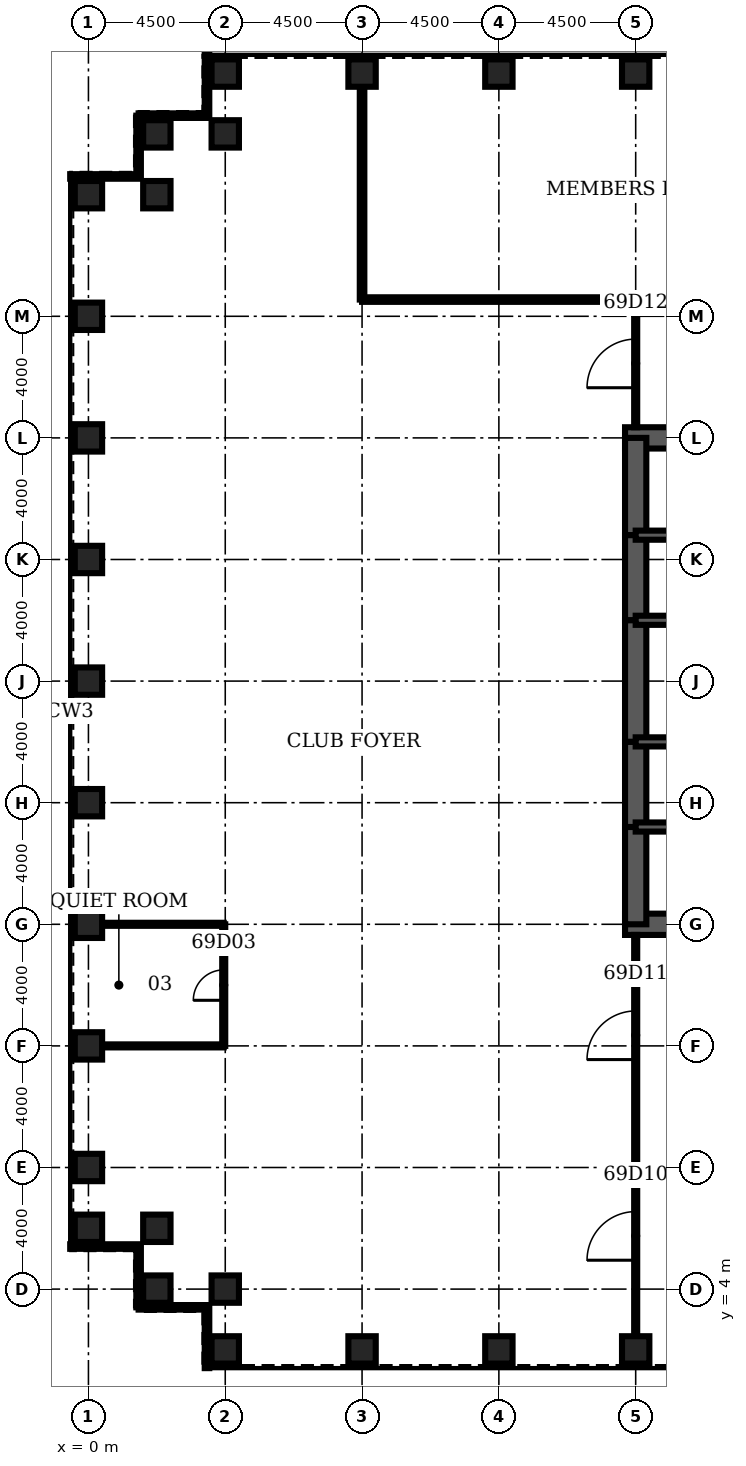
"""IFC4 building model, lengths in metres.
Left out: names, types, materials, properties, quantities, classifications, styles, units other than length and angle.
Written with IfcOpenShell. Run it as: python <this file> out.ifc"""

import sys

from ifc_helpers import new_model, si_unit, direction, frame, frame_2d, origin, origin_2d, place, context, subcontext, project, spatial, rectangle, hollow_rectangle, extrude, element, fill, save


model = new_model("IFC4")
c1 = context("Model", 3, precision=1e-05, world=origin(), true_north=direction((0.0, 1.0)))
c2 = subcontext(c1, "Body", "Model", "MODEL_VIEW")
j1 = project(units=[si_unit("LENGTHUNIT", "METRE"), si_unit("PLANEANGLEUNIT", "RADIAN")], contexts=[c1])
p1 = place(None, origin())
s1 = spatial("IfcSite", under=j1, at=p1, CompositionType="ELEMENT")
p2 = place(p1, origin())
s2 = spatial("IfcBuilding", under=s1, at=p2, CompositionType="ELEMENT")
p3 = place(p2, frame((0.0, 0.0, 304.7)))
s3 = spatial("IfcBuildingStorey", under=s2, at=p3, CompositionType="ELEMENT", Elevation=304.7)
for number, where, z_axis, x_axis in (
    (1, (4.5, 2.0, 0.0), (0.0, 0.0, 1.0), (0.0, 1.0, 0.0)),
    (2, (9.0, 2.0, 0.0), (0.0, 0.0, 1.0), (0.0, 1.0, 0.0)),
    (3, (13.5, 2.0, 0.0), (0.0, 0.0, 1.0), (0.0, 1.0, 0.0)),
    (4, (18.0, 2.0, 0.0), (0.0, 0.0, 1.0), (0.0, 1.0, 0.0)),
    (5, (18.0, 44.0, 0.0), (0.0, 0.0, 1.0), (0.0, 1.0, 0.0)),
    (6, (13.5, 44.0, 0.0), (0.0, 0.0, 1.0), (0.0, 1.0, 0.0)),
    (7, (9.0, 44.0, 0.0), (0.0, 0.0, 1.0), (0.0, 1.0, 0.0)),
    (8, (4.5, 44.0, 0.0), (0.0, 0.0, 1.0), (0.0, 1.0, 0.0)),
    (9, (4.5, 42.0, 0.0), (0.0, 0.0, 1.0), (0.0, 1.0, 0.0)),
    (10, (2.25, 42.0, 0.0), (0.0, 0.0, 1.0), (1.0, 0.0, 0.0)),
    (11, (2.25, 40.0, 0.0), (0.0, 0.0, 1.0), (1.0, 0.0, 0.0)),
    (12, (0.0, 40.0, 0.0), (0.0, 0.0, 1.0), (1.0, 0.0, 0.0)),
    (13, (0.0, 36.0, 0.0), (0.0, 0.0, 1.0), (1.0, 0.0, 0.0)),
    (14, (0.0, 32.0, 0.0), (0.0, 0.0, 1.0), (1.0, 0.0, 0.0)),
    (15, (0.0, 28.0, 0.0), (0.0, 0.0, 1.0), (1.0, 0.0, 0.0)),
    (16, (0.0, 24.0, 0.0), (0.0, 0.0, 1.0), (1.0, 0.0, 0.0)),
    (17, (0.0, 20.0, 0.0), (0.0, 0.0, 1.0), (1.0, 0.0, 0.0)),
    (18, (0.0, 16.0, 0.0), (0.0, 0.0, 1.0), (1.0, 0.0, 0.0)),
    (19, (0.0, 12.0, 0.0), (0.0, 0.0, 1.0), (1.0, 0.0, 0.0)),
    (20, (0.0, 8.0, 0.0), (0.0, 0.0, 1.0), (1.0, 0.0, 0.0)),
    (21, (0.0, 6.0, 0.0), (0.0, 0.0, 1.0), (1.0, 0.0, 0.0)),
    (22, (2.25, 6.0, 0.0), (0.0, 0.0, 1.0), (1.0, 0.0, 0.0)),
    (23, (2.25, 4.0, 0.0), (0.0, 0.0, 1.0), (1.0, 0.0, 0.0)),
    (24, (4.5, 4.0, 0.0), (0.0, 0.0, 1.0), (0.0, 1.0, 0.0)),
):
    element("IfcColumn", number, at=place(p3, frame(where, z_axis=z_axis, x_axis=x_axis)), inside=s3, PredefinedType="COLUMN", context=c2, shape_type="SweptSolid", body=[
        extrude(hollow_rectangle(XDim=0.9, YDim=0.9, WallThickness=0.06, at=origin_2d()), origin(), (0.0, 0.0, 1.0), 4.2),
    ])
for number, where, z_axis, x_axis in (
    (25, (17.65, 16.0, 0.0), (0.0, 0.0, 1.0), (1.0, 0.0, 0.0)),
    (26, (27.0, 32.0, 0.0), (0.0, 0.0, 1.0), (-1.0, 0.0, 0.0)),
):
    element("IfcWall", number, at=place(p3, frame(where, z_axis=z_axis, x_axis=x_axis)), inside=s3, PredefinedType="SHEAR", context=c2, shape_type="SweptSolid", body=[
        extrude(rectangle(XDim=9.35, YDim=0.7, at=frame_2d((4.675, 0.0))), origin(), (0.0, 0.0, 1.0), 4.2),
    ])
p4 = place(p3, frame((18.0, 32.0, 0.0), z_axis=(0.0, 0.0, 1.0), x_axis=(0.0, -1.0, 0.0)))
e27 = element("IfcWall", 27, at=p4, inside=s3, PredefinedType="SHEAR", context=c2, shape_type="SweptSolid", body=[
    extrude(rectangle(XDim=3.2, YDim=0.7, at=frame_2d((1.6, 0.0))), origin(), (0.0, 0.0, 1.0), 4.2),
])
p5 = place(p3, frame((18.0, 28.8, 0.0), z_axis=(0.0, 0.0, 1.0), x_axis=(0.0, -1.0, 0.0)))
e28 = element("IfcWall", 28, at=p5, inside=s3, PredefinedType="SHEAR", context=c2, shape_type="SweptSolid", body=[
    extrude(rectangle(XDim=2.8, YDim=0.7, at=frame_2d((1.4, 0.0))), origin(), (0.0, 0.0, 1.0), 4.2),
])
p6 = place(p5, frame((0.4, 0.0, 0.0)))
e29 = element("IfcOpeningElement", 29, at=p6, cuts=e28, PredefinedType="OPENING", context=c2, shape_type="SweptSolid", body=[
    extrude(rectangle(XDim=1.8, YDim=2.1, at=frame_2d((0.9, 1.05))), frame((0.0, 0.36, 0.0), z_axis=(0.0, -1.0, 0.0), x_axis=(1.0, 0.0, 0.0)), (0.0, 0.0, 1.0), 0.72),
])
p7 = place(p3, frame((18.0, 26.0, 0.0), z_axis=(0.0, 0.0, 1.0), x_axis=(0.0, -1.0, 0.0)))
e30 = element("IfcWall", 30, at=p7, inside=s3, PredefinedType="SHEAR", context=c2, shape_type="SweptSolid", body=[
    extrude(rectangle(XDim=4.0, YDim=0.7, at=frame_2d((2.0, 0.0))), origin(), (0.0, 0.0, 1.0), 4.2),
])
p8 = place(p3, frame((18.0, 22.0, 0.0), z_axis=(0.0, 0.0, 1.0), x_axis=(0.0, -1.0, 0.0)))
e31 = element("IfcWall", 31, at=p8, inside=s3, PredefinedType="SHEAR", context=c2, shape_type="SweptSolid", body=[
    extrude(rectangle(XDim=2.8, YDim=0.7, at=frame_2d((1.4, 0.0))), origin(), (0.0, 0.0, 1.0), 4.2),
])
p9 = place(p8, frame((0.6, 0.0, 0.0)))
e32 = element("IfcOpeningElement", 32, at=p9, cuts=e31, PredefinedType="OPENING", context=c2, shape_type="SweptSolid", body=[
    extrude(rectangle(XDim=1.8, YDim=2.1, at=frame_2d((0.9, 1.05))), frame((0.0, 0.36, 0.0), z_axis=(0.0, -1.0, 0.0), x_axis=(1.0, 0.0, 0.0)), (0.0, 0.0, 1.0), 0.72),
])
p10 = place(p3, frame((18.0, 19.2, 0.0), z_axis=(0.0, 0.0, 1.0), x_axis=(0.0, -1.0, 0.0)))
e33 = element("IfcWall", 33, at=p10, inside=s3, PredefinedType="SHEAR", context=c2, shape_type="SweptSolid", body=[
    extrude(rectangle(XDim=3.2, YDim=0.7, at=frame_2d((1.6, 0.0))), origin(), (0.0, 0.0, 1.0), 4.2),
])
p11 = place(p3, frame((18.0, 19.2, 0.0), z_axis=(0.0, 0.0, 1.0), x_axis=(1.0, 0.0, 0.0)))
e34 = element("IfcWall", 34, at=p11, inside=s3, PredefinedType="SOLIDWALL", context=c2, shape_type="SweptSolid", body=[
    extrude(rectangle(XDim=9.0, YDim=0.3, at=frame_2d((4.5, 0.0))), origin(), (0.0, 0.0, 1.0), 4.2),
])
p12 = place(p11, frame((0.65, 0.0, 0.0)))
e35 = element("IfcOpeningElement", 35, at=p12, cuts=e34, PredefinedType="OPENING", context=c2, shape_type="SweptSolid", body=[
    extrude(rectangle(XDim=1.0, YDim=2.1, at=frame_2d((0.5, 1.05))), frame((0.0, 0.16, 0.0), z_axis=(0.0, -1.0, 0.0), x_axis=(1.0, 0.0, 0.0)), (0.0, 0.0, 1.0), 0.32),
])
p13 = place(p3, frame((18.0, 28.8, 0.0), z_axis=(0.0, 0.0, 1.0), x_axis=(1.0, 0.0, 0.0)))
e36 = element("IfcWall", 36, at=p13, inside=s3, PredefinedType="SOLIDWALL", context=c2, shape_type="SweptSolid", body=[
    extrude(rectangle(XDim=9.0, YDim=0.3, at=frame_2d((4.5, 0.0))), origin(), (0.0, 0.0, 1.0), 4.2),
])
p14 = place(p13, frame((0.65, 0.0, 0.0)))
e37 = element("IfcOpeningElement", 37, at=p14, cuts=e36, PredefinedType="OPENING", context=c2, shape_type="SweptSolid", body=[
    extrude(rectangle(XDim=1.0, YDim=2.1, at=frame_2d((0.5, 1.05))), frame((0.0, 0.16, 0.0), z_axis=(0.0, -1.0, 0.0), x_axis=(1.0, 0.0, 0.0)), (0.0, 0.0, 1.0), 0.32),
])
p15 = place(p3, frame((18.0, 22.0, 0.0), z_axis=(0.0, 0.0, 1.0), x_axis=(1.0, 0.0, 0.0)))
e38 = element("IfcWall", 38, at=p15, inside=s3, PredefinedType="SOLIDWALL", context=c2, shape_type="SweptSolid", body=[
    extrude(rectangle(XDim=6.0, YDim=0.3, at=frame_2d((3.0, 0.0))), origin(), (0.0, 0.0, 1.0), 4.2),
])
p16 = place(p15, frame((4.4, 0.0, 0.0)))
e39 = element("IfcOpeningElement", 39, at=p16, cuts=e38, PredefinedType="OPENING", context=c2, shape_type="SweptSolid", body=[
    extrude(rectangle(XDim=1.0, YDim=2.1, at=frame_2d((0.5, 1.05))), frame((0.0, 0.16, 0.0), z_axis=(0.0, -1.0, 0.0), x_axis=(1.0, 0.0, 0.0)), (0.0, 0.0, 1.0), 0.32),
])
p17 = place(p15, frame((0.9, 0.0, 0.0)))
e40 = element("IfcOpeningElement", 40, at=p17, cuts=e38, PredefinedType="OPENING", context=c2, shape_type="SweptSolid", body=[
    extrude(rectangle(XDim=1.0, YDim=2.1, at=frame_2d((0.5, 1.05))), frame((0.0, 0.16, 0.0), z_axis=(0.0, -1.0, 0.0), x_axis=(1.0, 0.0, 0.0)), (0.0, 0.0, 1.0), 0.32),
])
p18 = place(p3, frame((18.0, 26.0, 0.0), z_axis=(0.0, 0.0, 1.0), x_axis=(1.0, 0.0, 0.0)))
e41 = element("IfcWall", 41, at=p18, inside=s3, PredefinedType="SOLIDWALL", context=c2, shape_type="SweptSolid", body=[
    extrude(rectangle(XDim=6.0, YDim=0.3, at=frame_2d((3.0, 0.0))), origin(), (0.0, 0.0, 1.0), 4.2),
])
for number, where, z_axis, x_axis in (
    (42, (0.45, 12.0, 0.0), (0.0, 0.0, 1.0), (1.0, 0.0, 0.0)),
    (43, (0.45, 16.0, 0.0), (0.0, 0.0, 1.0), (1.0, 0.0, 0.0)),
):
    element("IfcWall", number, at=place(p3, frame(where, z_axis=z_axis, x_axis=x_axis)), inside=s3, PredefinedType="PARTITIONING", context=c2, shape_type="SweptSolid", body=[
        extrude(rectangle(XDim=4.0, YDim=0.1, at=frame_2d((2.0, 0.0))), origin(), (0.0, 0.0, 1.0), 3.0),
    ])
p19 = place(p3, frame((9.0, 36.55, 0.0), z_axis=(0.0, 0.0, 1.0), x_axis=(1.0, 0.0, 0.0)))
e44 = element("IfcWall", 44, at=p19, inside=s3, PredefinedType="PARTITIONING", context=c2, shape_type="SweptSolid", body=[
    extrude(rectangle(XDim=22.5, YDim=0.15, at=frame_2d((11.25, 0.0))), origin(), (0.0, 0.0, 1.0), 3.0),
])
p20 = place(p19, frame((10.45, 0.0, 0.0)))
e45 = element("IfcOpeningElement", 45, at=p20, cuts=e44, PredefinedType="OPENING", context=c2, shape_type="SweptSolid", body=[
    extrude(rectangle(XDim=1.6, YDim=2.1, at=frame_2d((0.8, 1.05))), frame((0.0, 0.085, 0.0), z_axis=(0.0, -1.0, 0.0), x_axis=(1.0, 0.0, 0.0)), (0.0, 0.0, 1.0), 0.17),
])
p21 = place(p3, frame((4.45, 12.0, 0.0), z_axis=(0.0, 0.0, 1.0), x_axis=(0.0, 1.0, 0.0)))
e46 = element("IfcWall", 46, at=p21, inside=s3, PredefinedType="PARTITIONING", context=c2, shape_type="SweptSolid", body=[
    extrude(rectangle(XDim=4.0, YDim=0.1, at=frame_2d((2.0, 0.0))), origin(), (0.0, 0.0, 1.0), 3.0),
])
p22 = place(p21, frame((1.5, 0.0, 0.0)))
e47 = element("IfcOpeningElement", 47, at=p22, cuts=e46, PredefinedType="OPENING", context=c2, shape_type="SweptSolid", body=[
    extrude(rectangle(XDim=1.0, YDim=2.1, at=frame_2d((0.5, 1.05))), frame((0.0, 0.06, 0.0), z_axis=(0.0, -1.0, 0.0), x_axis=(1.0, 0.0, 0.0)), (0.0, 0.0, 1.0), 0.12),
])
p23 = place(p3, frame((9.0, 36.55, 0.0), z_axis=(0.0, 0.0, 1.0), x_axis=(0.0, 1.0, 0.0)))
e48 = element("IfcWall", 48, at=p23, inside=s3, PredefinedType="PARTITIONING", context=c2, shape_type="SweptSolid", body=[
    extrude(rectangle(XDim=7.0, YDim=0.15, at=frame_2d((3.5, 0.0))), origin(), (0.0, 0.0, 1.0), 3.0),
])
p24 = place(p3, frame((18.0, 2.45, 0.0), z_axis=(0.0, 0.0, 1.0), x_axis=(0.0, 1.0, 0.0)))
e49 = element("IfcWall", 49, at=p24, inside=s3, PredefinedType="PARTITIONING", context=c2, shape_type="SweptSolid", body=[
    extrude(rectangle(XDim=13.2, YDim=0.1, at=frame_2d((6.6, 0.0))), origin(), (0.0, 0.0, 1.0), 3.0),
])
p25 = place(p24, frame((2.5, 0.0, 0.0)))
e50 = element("IfcOpeningElement", 50, at=p25, cuts=e49, PredefinedType="OPENING", context=c2, shape_type="SweptSolid", body=[
    extrude(rectangle(XDim=1.6, YDim=2.1, at=frame_2d((0.8, 1.05))), frame((0.0, 0.06, 0.0), z_axis=(0.0, -1.0, 0.0), x_axis=(1.0, 0.0, 0.0)), (0.0, 0.0, 1.0), 0.12),
])
p26 = place(p24, frame((9.1, 0.0, 0.0)))
e51 = element("IfcOpeningElement", 51, at=p26, cuts=e49, PredefinedType="OPENING", context=c2, shape_type="SweptSolid", body=[
    extrude(rectangle(XDim=1.6, YDim=2.1, at=frame_2d((0.8, 1.05))), frame((0.0, 0.06, 0.0), z_axis=(0.0, -1.0, 0.0), x_axis=(1.0, 0.0, 0.0)), (0.0, 0.0, 1.0), 0.12),
])
p27 = place(p3, frame((18.0, 32.35, 0.0), z_axis=(0.0, 0.0, 1.0), x_axis=(0.0, 1.0, 0.0)))
e52 = element("IfcWall", 52, at=p27, inside=s3, PredefinedType="PARTITIONING", context=c2, shape_type="SweptSolid", body=[
    extrude(rectangle(XDim=4.2, YDim=0.1, at=frame_2d((2.1, 0.0))), origin(), (0.0, 0.0, 1.0), 3.0),
])
p28 = place(p27, frame((1.3, 0.0, 0.0)))
e53 = element("IfcOpeningElement", 53, at=p28, cuts=e52, PredefinedType="OPENING", context=c2, shape_type="SweptSolid", body=[
    extrude(rectangle(XDim=1.6, YDim=2.1, at=frame_2d((0.8, 1.05))), frame((0.0, 0.06, 0.0), z_axis=(0.0, -1.0, 0.0), x_axis=(1.0, 0.0, 0.0)), (0.0, 0.0, 1.0), 0.12),
])
p29 = place(p3, frame((3.9, 44.6, 0.0), z_axis=(0.0, 0.0, 1.0), x_axis=(0.0, -1.0, 0.0)))
e54 = element("IfcWall", 54, at=p29, inside=s3, PredefinedType="ELEMENTEDWALL", context=c2, shape_type="SweptSolid", body=[
    extrude(rectangle(XDim=2.0, YDim=0.15, at=frame_2d((1.0, 0.0))), origin(), (0.0, 0.0, 1.0), 4.04),
])
p30 = place(p3, frame((3.9, 42.6, 0.0), z_axis=(0.0, 0.0, 1.0), x_axis=(-1.0, 0.0, 0.0)))
e55 = element("IfcWall", 55, at=p30, inside=s3, PredefinedType="ELEMENTEDWALL", context=c2, shape_type="SweptSolid", body=[
    extrude(rectangle(XDim=2.25, YDim=0.15, at=frame_2d((1.125, 0.0))), origin(), (0.0, 0.0, 1.0), 4.04),
])
p31 = place(p3, frame((1.65, 42.6, 0.0), z_axis=(0.0, 0.0, 1.0), x_axis=(0.0, -1.0, 0.0)))
e56 = element("IfcWall", 56, at=p31, inside=s3, PredefinedType="ELEMENTEDWALL", context=c2, shape_type="SweptSolid", body=[
    extrude(rectangle(XDim=2.0, YDim=0.15, at=frame_2d((1.0, 0.0))), origin(), (0.0, 0.0, 1.0), 4.04),
])
for number, where, z_axis, x_axis in (
    (57, (1.65, 40.6, 0.0), (0.0, 0.0, 1.0), (-1.0, 0.0, 0.0)),
    (58, (-0.6, 5.4, 0.0), (0.0, 0.0, 1.0), (1.0, 0.0, 0.0)),
):
    element("IfcWall", number, at=place(p3, frame(where, z_axis=z_axis, x_axis=x_axis)), inside=s3, PredefinedType="ELEMENTEDWALL", context=c2, shape_type="SweptSolid", body=[
        extrude(rectangle(XDim=2.25, YDim=0.15, at=frame_2d((1.125, 0.0))), origin(), (0.0, 0.0, 1.0), 4.04),
    ])
p32 = place(p3, frame((1.65, 5.4, 0.0), z_axis=(0.0, 0.0, 1.0), x_axis=(0.0, -1.0, 0.0)))
e59 = element("IfcWall", 59, at=p32, inside=s3, PredefinedType="ELEMENTEDWALL", context=c2, shape_type="SweptSolid", body=[
    extrude(rectangle(XDim=2.0, YDim=0.15, at=frame_2d((1.0, 0.0))), origin(), (0.0, 0.0, 1.0), 4.04),
])
p33 = place(p3, frame((1.65, 3.4, 0.0), z_axis=(0.0, 0.0, 1.0), x_axis=(1.0, 0.0, 0.0)))
e60 = element("IfcWall", 60, at=p33, inside=s3, PredefinedType="ELEMENTEDWALL", context=c2, shape_type="SweptSolid", body=[
    extrude(rectangle(XDim=2.25, YDim=0.15, at=frame_2d((1.125, 0.0))), origin(), (0.0, 0.0, 1.0), 4.04),
])
p34 = place(p3, frame((3.9, 3.4, 0.0), z_axis=(0.0, 0.0, 1.0), x_axis=(0.0, -1.0, 0.0)))
e61 = element("IfcWall", 61, at=p34, inside=s3, PredefinedType="ELEMENTEDWALL", context=c2, shape_type="SweptSolid", body=[
    extrude(rectangle(XDim=2.0, YDim=0.15, at=frame_2d((1.0, 0.0))), origin(), (0.0, 0.0, 1.0), 4.04),
])
p35 = place(p22, origin())
e62 = element("IfcDoor", 62, at=p35, inside=s3, OperationType="SINGLE_SWING_LEFT", PredefinedType="DOOR", context=c2, shape_type="SweptSolid", body=[
    extrude(rectangle(XDim=1.0, YDim=2.1, at=frame_2d((0.5, 1.05))), frame((0.0, 0.025, 0.0), z_axis=(0.0, -1.0, 0.0), x_axis=(1.0, 0.0, 0.0)), (0.0, 0.0, 1.0), 0.05),
])
fill(e47, e62)
p36 = place(p25, origin())
e63 = element("IfcDoor", 63, at=p36, inside=s3, OperationType="SINGLE_SWING_LEFT", PredefinedType="DOOR", context=c2, shape_type="SweptSolid", body=[
    extrude(rectangle(XDim=1.6, YDim=2.1, at=frame_2d((0.8, 1.05))), frame((0.0, 0.025, 0.0), z_axis=(0.0, -1.0, 0.0), x_axis=(1.0, 0.0, 0.0)), (0.0, 0.0, 1.0), 0.05),
])
fill(e50, e63)
p37 = place(p26, origin())
e64 = element("IfcDoor", 64, at=p37, inside=s3, OperationType="SINGLE_SWING_LEFT", PredefinedType="DOOR", context=c2, shape_type="SweptSolid", body=[
    extrude(rectangle(XDim=1.6, YDim=2.1, at=frame_2d((0.8, 1.05))), frame((0.0, 0.025, 0.0), z_axis=(0.0, -1.0, 0.0), x_axis=(1.0, 0.0, 0.0)), (0.0, 0.0, 1.0), 0.05),
])
fill(e51, e64)
p38 = place(p28, origin())
e65 = element("IfcDoor", 65, at=p38, inside=s3, OperationType="SINGLE_SWING_LEFT", PredefinedType="DOOR", context=c2, shape_type="SweptSolid", body=[
    extrude(rectangle(XDim=1.6, YDim=2.1, at=frame_2d((0.8, 1.05))), frame((0.0, 0.025, 0.0), z_axis=(0.0, -1.0, 0.0), x_axis=(1.0, 0.0, 0.0)), (0.0, 0.0, 1.0), 0.05),
])
fill(e53, e65)
p39 = place(p12, origin())
e66 = element("IfcDoor", 66, at=p39, inside=s3, OperationType="SINGLE_SWING_LEFT", PredefinedType="DOOR", context=c2, shape_type="SweptSolid", body=[
    extrude(rectangle(XDim=1.0, YDim=2.1, at=frame_2d((0.5, 1.05))), frame((0.0, 0.025, 0.0), z_axis=(0.0, -1.0, 0.0), x_axis=(1.0, 0.0, 0.0)), (0.0, 0.0, 1.0), 0.05),
])
fill(e35, e66)
p40 = place(p14, origin())
e67 = element("IfcDoor", 67, at=p40, inside=s3, OperationType="SINGLE_SWING_LEFT", PredefinedType="DOOR", context=c2, shape_type="SweptSolid", body=[
    extrude(rectangle(XDim=1.0, YDim=2.1, at=frame_2d((0.5, 1.05))), frame((0.0, 0.025, 0.0), z_axis=(0.0, -1.0, 0.0), x_axis=(1.0, 0.0, 0.0)), (0.0, 0.0, 1.0), 0.05),
])
fill(e37, e67)
p41 = place(p9, origin())
e68 = element("IfcDoor", 68, at=p41, inside=s3, OperationType="SINGLE_SWING_LEFT", PredefinedType="DOOR", context=c2, shape_type="SweptSolid", body=[
    extrude(rectangle(XDim=1.8, YDim=2.1, at=frame_2d((0.9, 1.05))), frame((0.0, 0.35, 0.0), z_axis=(0.0, -1.0, 0.0), x_axis=(1.0, 0.0, 0.0)), (0.0, 0.0, 1.0), 0.699),
])
fill(e32, e68)
p42 = place(p6, origin())
e69 = element("IfcDoor", 69, at=p42, inside=s3, OperationType="SINGLE_SWING_LEFT", PredefinedType="DOOR", context=c2, shape_type="SweptSolid", body=[
    extrude(rectangle(XDim=1.8, YDim=2.1, at=frame_2d((0.9, 1.05))), frame((0.0, 0.35, 0.0), z_axis=(0.0, -1.0, 0.0), x_axis=(1.0, 0.0, 0.0)), (0.0, 0.0, 1.0), 0.699),
])
fill(e29, e69)
p43 = place(p17, origin())
e70 = element("IfcDoor", 70, at=p43, inside=s3, OperationType="SINGLE_SWING_LEFT", PredefinedType="DOOR", context=c2, shape_type="SweptSolid", body=[
    extrude(rectangle(XDim=1.0, YDim=2.1, at=frame_2d((0.5, 1.05))), frame((0.0, 0.025, 0.0), z_axis=(0.0, -1.0, 0.0), x_axis=(1.0, 0.0, 0.0)), (0.0, 0.0, 1.0), 0.05),
])
fill(e40, e70)
save(model, sys.argv[1])
